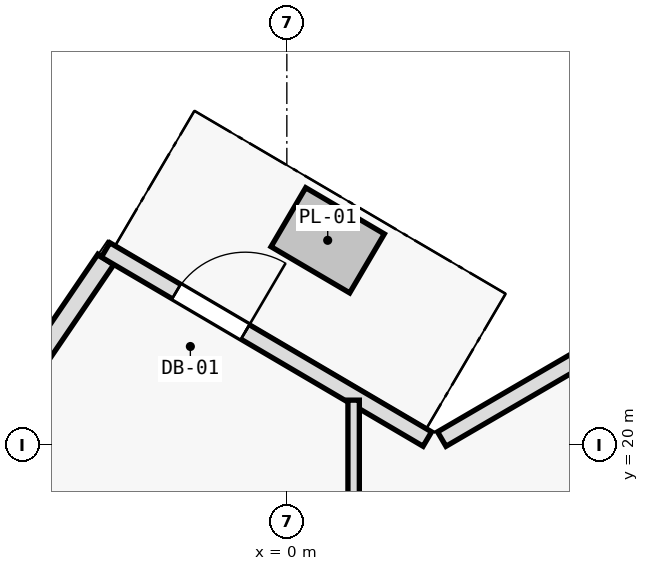
"""IFC4 building model, lengths in metres.
Left out: names, types, materials, properties, quantities, classifications, styles, units other than length and angle.
Written with IfcOpenShell. Run it as: python <this file> out.ifc"""

import sys

from ifc_helpers import new_model, si_unit, direction, frame, frame_2d, origin, place, context, subcontext, project, spatial, rectangle, extrude, element, fill, save


model = new_model("IFC4")
c1 = context("Model", 3, precision=1e-05, world=origin(), true_north=direction((0.0, 1.0)))
c2 = subcontext(c1, "Body", "Model", "MODEL_VIEW")
j1 = project(units=[si_unit("LENGTHUNIT", "METRE"), si_unit("PLANEANGLEUNIT", "RADIAN")], contexts=[c1])
p1 = place(None, origin())
s1 = spatial("IfcSite", under=j1, at=p1, CompositionType="ELEMENT")
p2 = place(p1, origin())
s2 = spatial("IfcBuilding", under=s1, at=p2, CompositionType="ELEMENT")
p3 = place(p2, frame((0.0, 0.0, 149.4)))
s3 = spatial("IfcBuildingStorey", under=s2, at=p3, CompositionType="ELEMENT", Elevation=149.4)
p4 = place(p3, frame((-8.75, 13.081, 0.0), z_axis=(0.0, 0.0, 1.0), x_axis=(0.562463958751, 0.82682180372, 0.0)))
e1 = element("IfcWall", 1, at=p4, inside=s3, PredefinedType="SOLIDWALL", context=c2, shape_type="SweptSolid", body=[
    extrude(rectangle(XDim=11.322, YDim=0.25, at=frame_2d((5.661, 0.0))), origin(), (0.0, 0.0, 1.0), 3.35),
])
p5 = place(p4, frame((4.911, 0.0, 0.62)))
e2 = element("IfcOpeningElement", 2, at=p5, cuts=e1, PredefinedType="OPENING", context=c2, shape_type="SweptSolid", body=[
    extrude(rectangle(XDim=1.5, YDim=2.0, at=frame_2d((0.75, 1.0))), frame((0.0, 0.135, 0.0), z_axis=(0.0, -1.0, 0.0), x_axis=(1.0, 0.0, 0.0)), (0.0, 0.0, 1.0), 0.27),
])
p6 = place(p3, frame((2.039, 20.079, 0.0), z_axis=(0.0, 0.0, 1.0), x_axis=(0.86398603623, 0.503515768571, 0.0)))
e3 = element("IfcWall", 3, at=p6, inside=s3, PredefinedType="SOLIDWALL", context=c2, shape_type="SweptSolid", body=[
    extrude(rectangle(XDim=4.444, YDim=0.22, at=frame_2d((2.222, 0.0))), origin(), (0.0, 0.0, 1.0), 3.35),
])
p7 = place(p3, frame((-2.385, 22.567, 0.0), z_axis=(0.0, 0.0, 1.0), x_axis=(0.8621258938, -0.506694131839, 0.0)))
e4 = element("IfcWall", 4, at=p7, inside=s3, PredefinedType="SOLIDWALL", context=c2, shape_type="SweptSolid", body=[
    extrude(rectangle(XDim=4.91, YDim=0.22, at=frame_2d((2.455, 0.0))), origin(), (0.0, 0.0, 1.0), 3.35),
])
p8 = place(p7, frame((1.08, 0.0, 0.0)))
e5 = element("IfcOpeningElement", 5, at=p8, cuts=e4, PredefinedType="OPENING", context=c2, shape_type="SweptSolid", body=[
    extrude(rectangle(XDim=1.05, YDim=2.15, at=frame_2d((0.525, 1.075))), frame((0.0, 0.12, 0.0), z_axis=(0.0, -1.0, 0.0), x_axis=(1.0, 0.0, 0.0)), (0.0, 0.0, 1.0), 0.24),
])
p9 = place(p3, frame((0.879, 12.42, 0.0), z_axis=(0.0, 0.0, 1.0), x_axis=(0.0, 1.0, 0.0)))
e6 = element("IfcWall", 6, at=p9, inside=s3, PredefinedType="PARTITIONING", context=c2, shape_type="SweptSolid", body=[
    extrude(rectangle(XDim=8.171, YDim=0.15, at=frame_2d((4.086, 0.0))), origin(), (0.0, 0.0, 1.0), 2.885),
])
p10 = place(p8, origin())
e7 = element("IfcDoor", 7, at=p10, inside=s3, OperationType="SINGLE_SWING_RIGHT", PredefinedType="DOOR", context=c2, shape_type="SweptSolid", body=[
    extrude(rectangle(XDim=1.05, YDim=2.15, at=frame_2d((0.525, 1.075))), frame((0.0, 0.025, 0.0), z_axis=(0.0, -1.0, 0.0), x_axis=(1.0, 0.0, 0.0)), (0.0, 0.0, 1.0), 0.05),
])
fill(e5, e7)
save(model, sys.argv[1])
